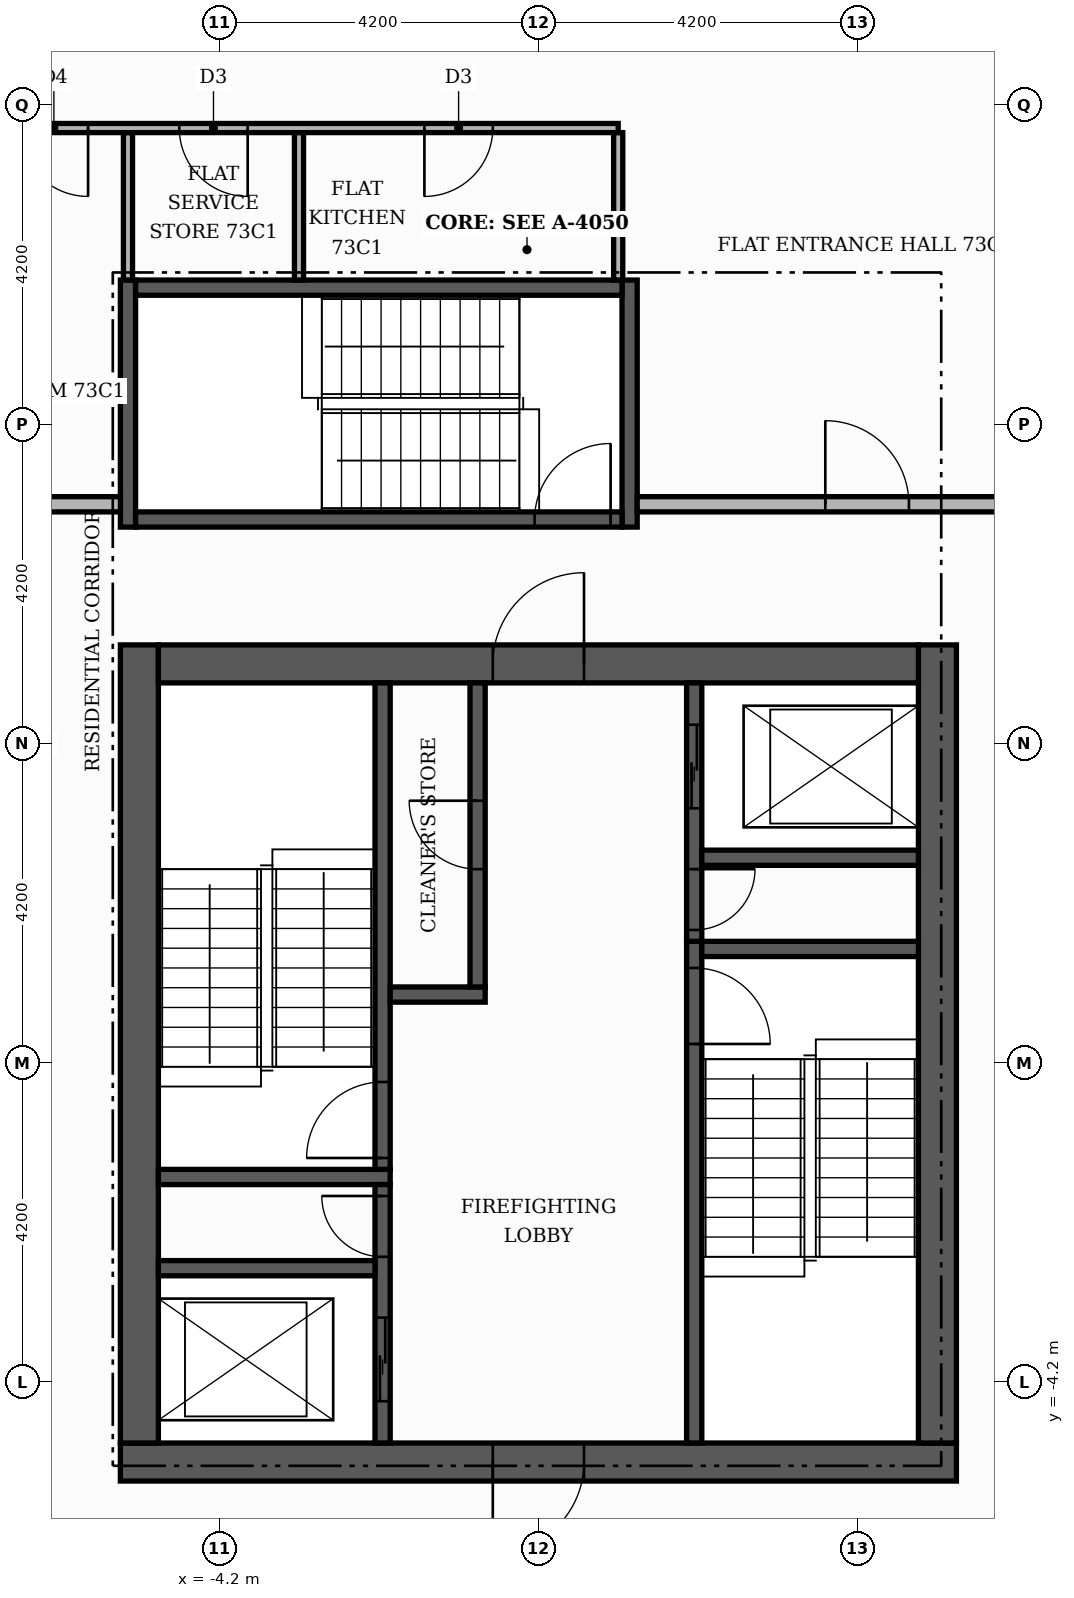
"""IFC4 building model, lengths in metres.
Left out: names, types, materials, properties, quantities, classifications, styles, units other than length and angle.
Written with IfcOpenShell. Run it as: python <this file> out.ifc"""

import sys

from ifc_helpers import new_model, si_unit, direction, frame, frame_2d, origin, place, context, subcontext, project, spatial, rectangle, extrude, element, fill, save


model = new_model("IFC4")
c1 = context("Model", 3, precision=1e-05, world=origin(), true_north=direction((0.0, 1.0)))
c2 = subcontext(c1, "Body", "Model", "MODEL_VIEW")
j1 = project(units=[si_unit("LENGTHUNIT", "METRE"), si_unit("PLANEANGLEUNIT", "RADIAN")], contexts=[c1])
p1 = place(None, origin())
s1 = spatial("IfcSite", under=j1, at=p1, CompositionType="ELEMENT")
p2 = place(p1, origin())
s2 = spatial("IfcBuilding", under=s1, at=p2, CompositionType="ELEMENT")
p3 = place(p2, frame((0.0, 0.0, 304.5)))
s3 = spatial("IfcBuildingStorey", under=s2, at=p3, CompositionType="ELEMENT", Elevation=304.5)
p4 = place(p3, frame((-5.5, -5.25, 0.0), z_axis=(0.0, 0.0, 1.0), x_axis=(1.0, 0.0, 0.0)))
e1 = element("IfcWall", 1, at=p4, inside=s3, PredefinedType="SHEAR", context=c2, shape_type="SweptSolid", body=[
    extrude(rectangle(XDim=11.0, YDim=0.5, at=frame_2d((5.5, 0.0))), origin(), (0.0, 0.0, 1.0), 3.55),
])
p5 = place(p4, frame((4.9, 0.0, 0.0)))
e2 = element("IfcOpeningElement", 2, at=p5, cuts=e1, PredefinedType="OPENING", context=c2, shape_type="SweptSolid", body=[
    extrude(rectangle(XDim=1.2, YDim=2.1, at=frame_2d((0.6, 1.05))), frame((0.0, 0.26, 0.0), z_axis=(0.0, -1.0, 0.0), x_axis=(1.0, 0.0, 0.0)), (0.0, 0.0, 1.0), 0.52),
])
for number, where, z_axis, x_axis in (
    (3, (-5.25, -5.0, 0.0), (0.0, 0.0, 1.0), (0.0, 1.0, 0.0)),
    (4, (5.25, -5.0, 0.0), (0.0, 0.0, 1.0), (0.0, 1.0, 0.0)),
):
    element("IfcWall", number, at=place(p3, frame(where, z_axis=z_axis, x_axis=x_axis)), inside=s3, PredefinedType="SHEAR", context=c2, shape_type="SweptSolid", body=[
        extrude(rectangle(XDim=10.5, YDim=0.5, at=frame_2d((5.25, 0.0))), origin(), (0.0, 0.0, 1.0), 3.55),
    ])
p6 = place(p3, frame((-5.0, 5.25, 0.0), z_axis=(0.0, 0.0, 1.0), x_axis=(1.0, 0.0, 0.0)))
e5 = element("IfcWall", 5, at=p6, inside=s3, PredefinedType="SHEAR", context=c2, shape_type="SweptSolid", body=[
    extrude(rectangle(XDim=10.0, YDim=0.5, at=frame_2d((5.0, 0.0))), origin(), (0.0, 0.0, 1.0), 3.55),
])
p7 = place(p6, frame((4.4, 0.0, 0.0)))
e6 = element("IfcOpeningElement", 6, at=p7, cuts=e5, PredefinedType="OPENING", context=c2, shape_type="SweptSolid", body=[
    extrude(rectangle(XDim=1.2, YDim=2.1, at=frame_2d((0.6, 1.05))), frame((0.0, 0.26, 0.0), z_axis=(0.0, -1.0, 0.0), x_axis=(1.0, 0.0, 0.0)), (0.0, 0.0, 1.0), 0.52),
])
p8 = place(p3, frame((2.05, -5.0, 0.0), z_axis=(0.0, 0.0, 1.0), x_axis=(0.0, 1.0, 0.0)))
e7 = element("IfcWall", 7, at=p8, inside=s3, PredefinedType="SHEAR", context=c2, shape_type="SweptSolid", body=[
    extrude(rectangle(XDim=6.6, YDim=0.2, at=frame_2d((3.3, 0.0))), origin(), (0.0, 0.0, 1.0), 3.55),
])
p9 = place(p8, frame((5.25, 0.0, 0.0)))
e8 = element("IfcOpeningElement", 8, at=p9, cuts=e7, PredefinedType="OPENING", context=c2, shape_type="SweptSolid", body=[
    extrude(rectangle(XDim=1.0, YDim=2.1, at=frame_2d((0.5, 1.05))), frame((0.0, 0.11, 0.0), z_axis=(0.0, -1.0, 0.0), x_axis=(1.0, 0.0, 0.0)), (0.0, 0.0, 1.0), 0.22),
])
p10 = place(p3, frame((-5.0, -1.5, 0.0), z_axis=(0.0, 0.0, 1.0), x_axis=(1.0, 0.0, 0.0)))
e9 = element("IfcWall", 9, at=p10, inside=s3, PredefinedType="SHEAR", context=c2, shape_type="SweptSolid", body=[
    extrude(rectangle(XDim=3.05, YDim=0.2, at=frame_2d((1.525, 0.0))), origin(), (0.0, 0.0, 1.0), 3.55),
])
p11 = place(p3, frame((-2.05, -1.4, 0.0), z_axis=(0.0, 0.0, 1.0), x_axis=(0.0, 1.0, 0.0)))
e10 = element("IfcWall", 10, at=p11, inside=s3, PredefinedType="SHEAR", context=c2, shape_type="SweptSolid", body=[
    extrude(rectangle(XDim=6.4, YDim=0.2, at=frame_2d((3.2, 0.0))), origin(), (0.0, 0.0, 1.0), 3.55),
])
p12 = place(p11, frame((0.15, 0.0, 0.0)))
e11 = element("IfcOpeningElement", 11, at=p12, cuts=e10, PredefinedType="OPENING", context=c2, shape_type="SweptSolid", body=[
    extrude(rectangle(XDim=1.0, YDim=2.1, at=frame_2d((0.5, 1.05))), frame((0.0, 0.11, 0.0), z_axis=(0.0, -1.0, 0.0), x_axis=(1.0, 0.0, 0.0)), (0.0, 0.0, 1.0), 0.22),
])
p13 = place(p3, frame((2.15, 1.5, 0.0), z_axis=(0.0, 0.0, 1.0), x_axis=(1.0, 0.0, 0.0)))
e12 = element("IfcWall", 12, at=p13, inside=s3, PredefinedType="SHEAR", context=c2, shape_type="SweptSolid", body=[
    extrude(rectangle(XDim=2.85, YDim=0.2, at=frame_2d((1.425, 0.0))), origin(), (0.0, 0.0, 1.0), 3.55),
])
p14 = place(p3, frame((-2.05, -5.0, 0.0), z_axis=(0.0, 0.0, 1.0), x_axis=(0.0, 1.0, 0.0)))
e13 = element("IfcWall", 13, at=p14, inside=s3, PredefinedType="SHEAR", context=c2, shape_type="SweptSolid", body=[
    extrude(rectangle(XDim=3.4, YDim=0.2, at=frame_2d((1.7, 0.0))), origin(), (0.0, 0.0, 1.0), 3.55),
])
p15 = place(p14, frame((0.55, 0.0, 0.0)))
e14 = element("IfcOpeningElement", 14, at=p15, cuts=e13, PredefinedType="OPENING", context=c2, shape_type="SweptSolid", body=[
    extrude(rectangle(XDim=1.1, YDim=2.1, at=frame_2d((0.55, 1.05))), frame((0.0, 0.11, 0.0), z_axis=(0.0, -1.0, 0.0), x_axis=(1.0, 0.0, 0.0)), (0.0, 0.0, 1.0), 0.22),
])
p16 = place(p14, frame((2.45, 0.0, 0.0)))
e15 = element("IfcOpeningElement", 15, at=p16, cuts=e13, PredefinedType="OPENING", context=c2, shape_type="SweptSolid", body=[
    extrude(rectangle(XDim=0.8, YDim=2.1, at=frame_2d((0.4, 1.05))), frame((0.0, 0.11, 0.0), z_axis=(0.0, -1.0, 0.0), x_axis=(1.0, 0.0, 0.0)), (0.0, 0.0, 1.0), 0.22),
])
p17 = place(p3, frame((-5.0, -2.7, 0.0), z_axis=(0.0, 0.0, 1.0), x_axis=(1.0, 0.0, 0.0)))
e16 = element("IfcWall", 16, at=p17, inside=s3, PredefinedType="SHEAR", context=c2, shape_type="SweptSolid", body=[
    extrude(rectangle(XDim=2.85, YDim=0.2, at=frame_2d((1.425, 0.0))), origin(), (0.0, 0.0, 1.0), 3.55),
])
p18 = place(p3, frame((-1.95, 0.9, 0.0), z_axis=(0.0, 0.0, 1.0), x_axis=(1.0, 0.0, 0.0)))
e17 = element("IfcWall", 17, at=p18, inside=s3, PredefinedType="SHEAR", context=c2, shape_type="SweptSolid", body=[
    extrude(rectangle(XDim=1.25, YDim=0.2, at=frame_2d((0.625, 0.0))), origin(), (0.0, 0.0, 1.0), 3.55),
])
p19 = place(p3, frame((-0.8, 1.0, 0.0), z_axis=(0.0, 0.0, 1.0), x_axis=(0.0, 1.0, 0.0)))
e18 = element("IfcWall", 18, at=p19, inside=s3, PredefinedType="SHEAR", context=c2, shape_type="SweptSolid", body=[
    extrude(rectangle(XDim=4.0, YDim=0.2, at=frame_2d((2.0, 0.0))), origin(), (0.0, 0.0, 1.0), 3.55),
])
p20 = place(p19, frame((1.55, 0.0, 0.0)))
e19 = element("IfcOpeningElement", 19, at=p20, cuts=e18, PredefinedType="OPENING", context=c2, shape_type="SweptSolid", body=[
    extrude(rectangle(XDim=0.9, YDim=2.1, at=frame_2d((0.45, 1.05))), frame((0.0, 0.11, 0.0), z_axis=(0.0, -1.0, 0.0), x_axis=(1.0, 0.0, 0.0)), (0.0, 0.0, 1.0), 0.22),
])
p21 = place(p3, frame((2.05, 1.6, 0.0), z_axis=(0.0, 0.0, 1.0), x_axis=(0.0, 1.0, 0.0)))
e20 = element("IfcWall", 20, at=p21, inside=s3, PredefinedType="SHEAR", context=c2, shape_type="SweptSolid", body=[
    extrude(rectangle(XDim=3.4, YDim=0.2, at=frame_2d((1.7, 0.0))), origin(), (0.0, 0.0, 1.0), 3.55),
])
p22 = place(p21, frame((1.75, 0.0, 0.0)))
e21 = element("IfcOpeningElement", 21, at=p22, cuts=e20, PredefinedType="OPENING", context=c2, shape_type="SweptSolid", body=[
    extrude(rectangle(XDim=1.1, YDim=2.1, at=frame_2d((0.55, 1.05))), frame((0.0, 0.11, 0.0), z_axis=(0.0, -1.0, 0.0), x_axis=(1.0, 0.0, 0.0)), (0.0, 0.0, 1.0), 0.22),
])
p23 = place(p21, frame((0.15, 0.0, 0.0)))
e22 = element("IfcOpeningElement", 22, at=p23, cuts=e20, PredefinedType="OPENING", context=c2, shape_type="SweptSolid", body=[
    extrude(rectangle(XDim=0.8, YDim=2.1, at=frame_2d((0.4, 1.05))), frame((0.0, 0.11, 0.0), z_axis=(0.0, -1.0, 0.0), x_axis=(1.0, 0.0, 0.0)), (0.0, 0.0, 1.0), 0.22),
])
p24 = place(p3, frame((2.15, 2.7, 0.0), z_axis=(0.0, 0.0, 1.0), x_axis=(1.0, 0.0, 0.0)))
e23 = element("IfcWall", 23, at=p24, inside=s3, PredefinedType="SHEAR", context=c2, shape_type="SweptSolid", body=[
    extrude(rectangle(XDim=2.85, YDim=0.2, at=frame_2d((1.425, 0.0))), origin(), (0.0, 0.0, 1.0), 3.55),
])
for number, where, z_axis, x_axis in (
    (24, (-5.4, 7.05, 0.0), (0.0, 0.0, 1.0), (0.0, 1.0, 0.0)),
    (25, (1.2, 7.05, 0.0), (0.0, 0.0, 1.0), (0.0, 1.0, 0.0)),
):
    element("IfcWall", number, at=place(p3, frame(where, z_axis=z_axis, x_axis=x_axis)), inside=s3, PredefinedType="SHEAR", context=c2, shape_type="SweptSolid", body=[
        extrude(rectangle(XDim=3.25, YDim=0.2, at=frame_2d((1.625, 0.0))), origin(), (0.0, 0.0, 1.0), 3.55),
    ])
p25 = place(p3, frame((-5.3, 7.15, 0.0), z_axis=(0.0, 0.0, 1.0), x_axis=(1.0, 0.0, 0.0)))
e26 = element("IfcWall", 26, at=p25, inside=s3, PredefinedType="SHEAR", context=c2, shape_type="SweptSolid", body=[
    extrude(rectangle(XDim=6.4, YDim=0.2, at=frame_2d((3.2, 0.0))), origin(), (0.0, 0.0, 1.0), 3.55),
])
p26 = place(p25, frame((5.25, 0.0, 0.0)))
e27 = element("IfcOpeningElement", 27, at=p26, cuts=e26, PredefinedType="OPENING", context=c2, shape_type="SweptSolid", body=[
    extrude(rectangle(XDim=1.0, YDim=2.1, at=frame_2d((0.5, 1.05))), frame((0.0, 0.11, 0.0), z_axis=(0.0, -1.0, 0.0), x_axis=(1.0, 0.0, 0.0)), (0.0, 0.0, 1.0), 0.22),
])
p27 = place(p3, frame((-5.3, 10.2, 0.0), z_axis=(0.0, 0.0, 1.0), x_axis=(1.0, 0.0, 0.0)))
e28 = element("IfcWall", 28, at=p27, inside=s3, PredefinedType="SHEAR", context=c2, shape_type="SweptSolid", body=[
    extrude(rectangle(XDim=6.4, YDim=0.2, at=frame_2d((3.2, 0.0))), origin(), (0.0, 0.0, 1.0), 3.55),
])
p28 = place(p3, frame((-7.35, 7.35, 0.0), z_axis=(0.0, 0.0, 1.0), x_axis=(1.0, 0.0, 0.0)))
e29 = element("IfcWall", 29, at=p28, inside=s3, PredefinedType="PARTITIONING", context=c2, shape_type="SweptSolid", body=[
    extrude(rectangle(XDim=1.85, YDim=0.2, at=frame_2d((0.925, 0.0))), origin(), (0.0, 0.0, 1.0), 3.55),
])
p29 = place(p3, frame((1.3, 7.35, 0.0), z_axis=(0.0, 0.0, 1.0), x_axis=(1.0, 0.0, 0.0)))
e30 = element("IfcWall", 30, at=p29, inside=s3, PredefinedType="PARTITIONING", context=c2, shape_type="SweptSolid", body=[
    extrude(rectangle(XDim=17.2, YDim=0.2, at=frame_2d((8.6, 0.0))), origin(), (0.0, 0.0, 1.0), 3.55),
])
p30 = place(p29, frame((2.475, 0.0, 0.0)))
e31 = element("IfcOpeningElement", 31, at=p30, cuts=e30, PredefinedType="OPENING", context=c2, shape_type="SweptSolid", body=[
    extrude(rectangle(XDim=1.1, YDim=2.4, at=frame_2d((0.55, 1.2))), frame((0.0, 0.11, 0.0), z_axis=(0.0, -1.0, 0.0), x_axis=(1.0, 0.0, 0.0)), (0.0, 0.0, 1.0), 0.22),
])
for number, where, z_axis, x_axis in (
    (32, (-5.4, 10.3, 0.0), (0.0, 0.0, 1.0), (0.0, 1.0, 0.0)),
    (33, (-3.15, 10.3, 0.0), (0.0, 0.0, 1.0), (0.0, 1.0, 0.0)),
    (34, (1.05, 10.3, 0.0), (0.0, 0.0, 1.0), (0.0, 1.0, 0.0)),
):
    element("IfcWall", number, at=place(p3, frame(where, z_axis=z_axis, x_axis=x_axis)), inside=s3, PredefinedType="PARTITIONING", context=c2, shape_type="SweptSolid", body=[
        extrude(rectangle(XDim=1.94, YDim=0.12, at=frame_2d((0.97, 0.0))), origin(), (0.0, 0.0, 1.0), 3.55),
    ])
p31 = place(p3, frame((-7.25, 12.3, 0.0), z_axis=(0.0, 0.0, 1.0), x_axis=(1.0, 0.0, 0.0)))
e35 = element("IfcWall", 35, at=p31, inside=s3, PredefinedType="PARTITIONING", context=c2, shape_type="SweptSolid", body=[
    extrude(rectangle(XDim=8.3, YDim=0.12, at=frame_2d((4.15, 0.0))), origin(), (0.0, 0.0, 1.0), 3.55),
])
p32 = place(p31, frame((5.75, 0.0, 0.0)))
e36 = element("IfcOpeningElement", 36, at=p32, cuts=e35, PredefinedType="OPENING", context=c2, shape_type="SweptSolid", body=[
    extrude(rectangle(XDim=0.9, YDim=2.1, at=frame_2d((0.45, 1.05))), frame((0.0, 0.07, 0.0), z_axis=(0.0, -1.0, 0.0), x_axis=(1.0, 0.0, 0.0)), (0.0, 0.0, 1.0), 0.14),
])
p33 = place(p31, frame((2.525, 0.0, 0.0)))
e37 = element("IfcOpeningElement", 37, at=p33, cuts=e35, PredefinedType="OPENING", context=c2, shape_type="SweptSolid", body=[
    extrude(rectangle(XDim=0.9, YDim=2.1, at=frame_2d((0.45, 1.05))), frame((0.0, 0.07, 0.0), z_axis=(0.0, -1.0, 0.0), x_axis=(1.0, 0.0, 0.0)), (0.0, 0.0, 1.0), 0.14),
])
p34 = place(p31, frame((0.425, 0.0, 0.0)))
e38 = element("IfcOpeningElement", 38, at=p34, cuts=e35, PredefinedType="OPENING", context=c2, shape_type="SweptSolid", body=[
    extrude(rectangle(XDim=0.9, YDim=2.1, at=frame_2d((0.45, 1.05))), frame((0.0, 0.07, 0.0), z_axis=(0.0, -1.0, 0.0), x_axis=(1.0, 0.0, 0.0)), (0.0, 0.0, 1.0), 0.14),
])
p35 = place(p22, origin())
e39 = element("IfcDoor", 39, at=p35, inside=s3, OperationType="SLIDING_TO_LEFT", PredefinedType="DOOR", context=c2, shape_type="SweptSolid", body=[
    extrude(rectangle(XDim=1.1, YDim=2.1, at=frame_2d((0.55, 1.05))), frame((0.0, 0.025, 0.0), z_axis=(0.0, -1.0, 0.0), x_axis=(1.0, 0.0, 0.0)), (0.0, 0.0, 1.0), 0.05),
])
fill(e21, e39)
p36 = place(p15, origin())
e40 = element("IfcDoor", 40, at=p36, inside=s3, OperationType="SLIDING_TO_LEFT", PredefinedType="DOOR", context=c2, shape_type="SweptSolid", body=[
    extrude(rectangle(XDim=1.1, YDim=2.1, at=frame_2d((0.55, 1.05))), frame((0.0, 0.025, 0.0), z_axis=(0.0, -1.0, 0.0), x_axis=(1.0, 0.0, 0.0)), (0.0, 0.0, 1.0), 0.05),
])
fill(e14, e40)
p37 = place(p12, origin())
e41 = element("IfcDoor", 41, at=p37, inside=s3, OperationType="SINGLE_SWING_LEFT", PredefinedType="DOOR", context=c2, shape_type="SweptSolid", body=[
    extrude(rectangle(XDim=1.0, YDim=2.1, at=frame_2d((0.5, 1.05))), frame((0.0, 0.025, 0.0), z_axis=(0.0, -1.0, 0.0), x_axis=(1.0, 0.0, 0.0)), (0.0, 0.0, 1.0), 0.05),
])
fill(e11, e41)
p38 = place(p9, frame((1.0, 0.0, 0.0), z_axis=(0.0, 0.0, 1.0), x_axis=(-1.0, 0.0, 0.0)))
e42 = element("IfcDoor", 42, at=p38, inside=s3, OperationType="SINGLE_SWING_LEFT", PredefinedType="DOOR", context=c2, shape_type="SweptSolid", body=[
    extrude(rectangle(XDim=1.0, YDim=2.1, at=frame_2d((0.5, 1.05))), frame((0.0, 0.025, 0.0), z_axis=(0.0, -1.0, 0.0), x_axis=(1.0, 0.0, 0.0)), (0.0, 0.0, 1.0), 0.05),
])
fill(e8, e42)
p39 = place(p23, frame((0.8, 0.0, 0.0), z_axis=(0.0, 0.0, 1.0), x_axis=(-1.0, 0.0, 0.0)))
e43 = element("IfcDoor", 43, at=p39, inside=s3, OperationType="SINGLE_SWING_RIGHT", PredefinedType="DOOR", context=c2, shape_type="SweptSolid", body=[
    extrude(rectangle(XDim=0.8, YDim=2.1, at=frame_2d((0.4, 1.05))), frame((0.0, 0.025, 0.0), z_axis=(0.0, -1.0, 0.0), x_axis=(1.0, 0.0, 0.0)), (0.0, 0.0, 1.0), 0.05),
])
fill(e22, e43)
p40 = place(p16, origin())
e44 = element("IfcDoor", 44, at=p40, inside=s3, OperationType="SINGLE_SWING_RIGHT", PredefinedType="DOOR", context=c2, shape_type="SweptSolid", body=[
    extrude(rectangle(XDim=0.8, YDim=2.1, at=frame_2d((0.4, 1.05))), frame((0.0, 0.025, 0.0), z_axis=(0.0, -1.0, 0.0), x_axis=(1.0, 0.0, 0.0)), (0.0, 0.0, 1.0), 0.05),
])
fill(e15, e44)
p41 = place(p26, origin())
e45 = element("IfcDoor", 45, at=p41, inside=s3, OperationType="SINGLE_SWING_RIGHT", PredefinedType="DOOR", context=c2, shape_type="SweptSolid", body=[
    extrude(rectangle(XDim=1.0, YDim=2.1, at=frame_2d((0.5, 1.05))), frame((0.0, 0.025, 0.0), z_axis=(0.0, -1.0, 0.0), x_axis=(1.0, 0.0, 0.0)), (0.0, 0.0, 1.0), 0.05),
])
fill(e27, e45)
p42 = place(p20, origin())
e46 = element("IfcDoor", 46, at=p42, inside=s3, OperationType="SINGLE_SWING_RIGHT", PredefinedType="DOOR", context=c2, shape_type="SweptSolid", body=[
    extrude(rectangle(XDim=0.9, YDim=2.1, at=frame_2d((0.45, 1.05))), frame((0.0, 0.025, 0.0), z_axis=(0.0, -1.0, 0.0), x_axis=(1.0, 0.0, 0.0)), (0.0, 0.0, 1.0), 0.05),
])
fill(e19, e46)
p43 = place(p7, origin())
e47 = element("IfcDoor", 47, at=p43, inside=s3, OperationType="SINGLE_SWING_RIGHT", PredefinedType="DOOR", context=c2, shape_type="SweptSolid", body=[
    extrude(rectangle(XDim=1.2, YDim=2.1, at=frame_2d((0.6, 1.05))), frame((0.0, 0.025, 0.0), z_axis=(0.0, -1.0, 0.0), x_axis=(1.0, 0.0, 0.0)), (0.0, 0.0, 1.0), 0.05),
])
fill(e6, e47)
p44 = place(p5, frame((1.2, 0.0, 0.0), z_axis=(0.0, 0.0, 1.0), x_axis=(-1.0, 0.0, 0.0)))
e48 = element("IfcDoor", 48, at=p44, inside=s3, OperationType="SINGLE_SWING_LEFT", PredefinedType="DOOR", context=c2, shape_type="SweptSolid", body=[
    extrude(rectangle(XDim=1.2, YDim=2.1, at=frame_2d((0.6, 1.05))), frame((0.0, 0.025, 0.0), z_axis=(0.0, -1.0, 0.0), x_axis=(1.0, 0.0, 0.0)), (0.0, 0.0, 1.0), 0.05),
])
fill(e2, e48)
p45 = place(p30, origin())
e49 = element("IfcDoor", 49, at=p45, inside=s3, OperationType="SINGLE_SWING_LEFT", PredefinedType="DOOR", context=c2, shape_type="SweptSolid", body=[
    extrude(rectangle(XDim=1.1, YDim=2.4, at=frame_2d((0.55, 1.2))), frame((0.0, 0.025, 0.0), z_axis=(0.0, -1.0, 0.0), x_axis=(1.0, 0.0, 0.0)), (0.0, 0.0, 1.0), 0.05),
])
fill(e31, e49)
p46 = place(p32, frame((0.9, 0.0, 0.0), z_axis=(0.0, 0.0, 1.0), x_axis=(-1.0, 0.0, 0.0)))
e50 = element("IfcDoor", 50, at=p46, inside=s3, OperationType="SINGLE_SWING_LEFT", PredefinedType="DOOR", context=c2, shape_type="SweptSolid", body=[
    extrude(rectangle(XDim=0.9, YDim=2.1, at=frame_2d((0.45, 1.05))), frame((0.0, 0.025, 0.0), z_axis=(0.0, -1.0, 0.0), x_axis=(1.0, 0.0, 0.0)), (0.0, 0.0, 1.0), 0.05),
])
fill(e36, e50)
p47 = place(p33, frame((0.9, 0.0, 0.0), z_axis=(0.0, 0.0, 1.0), x_axis=(-1.0, 0.0, 0.0)))
e51 = element("IfcDoor", 51, at=p47, inside=s3, OperationType="SINGLE_SWING_RIGHT", PredefinedType="DOOR", context=c2, shape_type="SweptSolid", body=[
    extrude(rectangle(XDim=0.9, YDim=2.1, at=frame_2d((0.45, 1.05))), frame((0.0, 0.025, 0.0), z_axis=(0.0, -1.0, 0.0), x_axis=(1.0, 0.0, 0.0)), (0.0, 0.0, 1.0), 0.05),
])
fill(e37, e51)
p48 = place(p34, frame((0.9, 0.0, 0.0), z_axis=(0.0, 0.0, 1.0), x_axis=(-1.0, 0.0, 0.0)))
e52 = element("IfcDoor", 52, at=p48, inside=s3, OperationType="SINGLE_SWING_RIGHT", PredefinedType="DOOR", context=c2, shape_type="SweptSolid", body=[
    extrude(rectangle(XDim=0.9, YDim=2.1, at=frame_2d((0.45, 1.05))), frame((0.0, 0.025, 0.0), z_axis=(0.0, -1.0, 0.0), x_axis=(1.0, 0.0, 0.0)), (0.0, 0.0, 1.0), 0.05),
])
fill(e38, e52)
save(model, sys.argv[1])
